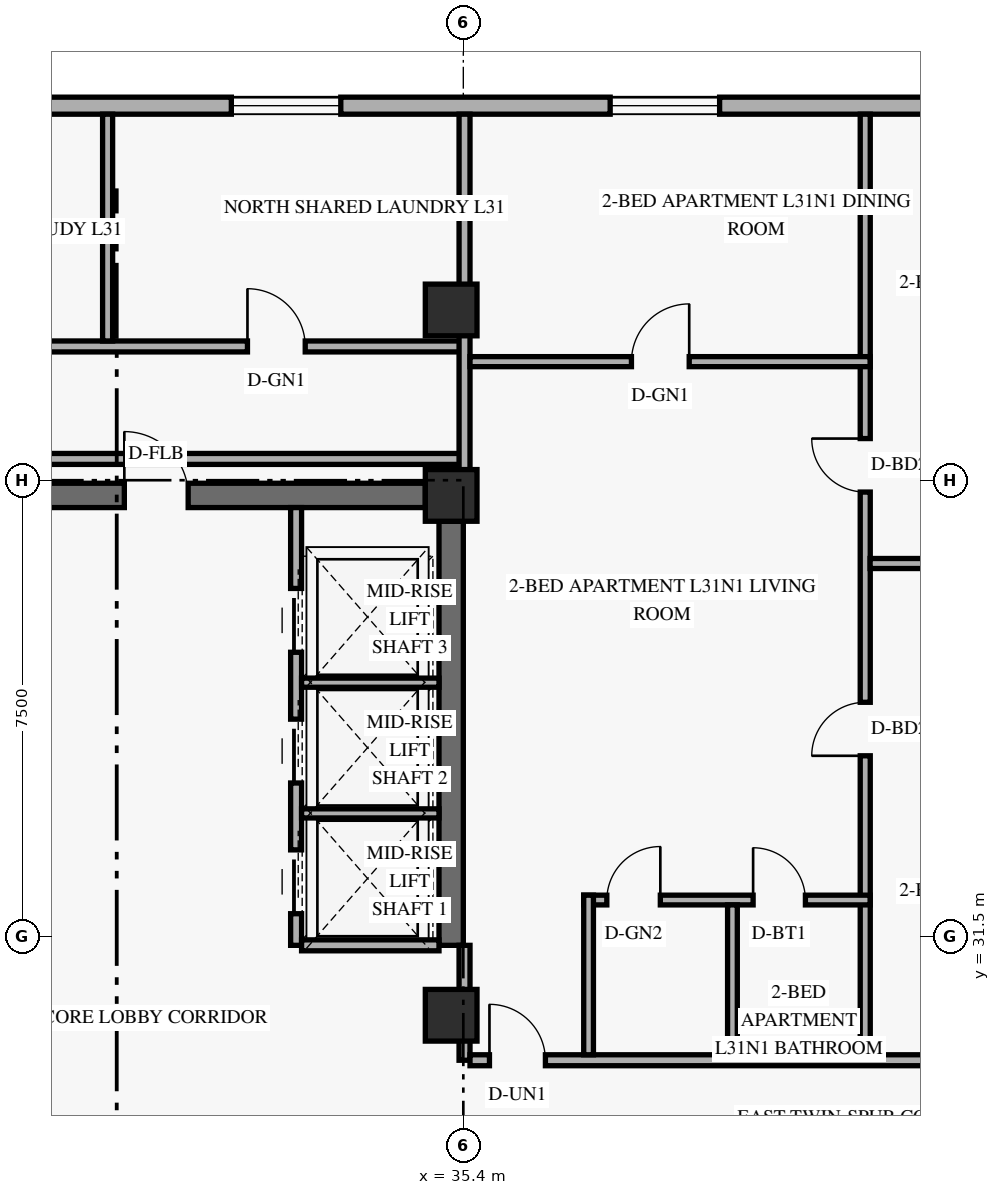
"""IFC4 building model, lengths in metres.
Left out: names, types, materials, properties, quantities, classifications, styles, units other than length and angle.
Written with IfcOpenShell. Run it as: python <this file> out.ifc"""

import sys

from ifc_helpers import new_model, si_unit, direction, frame, frame_2d, origin, origin_2d, place, context, subcontext, project, spatial, rectangle, extrude, element, fill, save


model = new_model("IFC4")
c1 = context("Model", 3, precision=1e-05, world=origin(), true_north=direction((0.0, 1.0)))
c2 = subcontext(c1, "Body", "Model", "MODEL_VIEW")
j1 = project(units=[si_unit("LENGTHUNIT", "METRE"), si_unit("PLANEANGLEUNIT", "RADIAN")], contexts=[c1])
p1 = place(None, origin())
s1 = spatial("IfcSite", under=j1, at=p1, CompositionType="ELEMENT")
p2 = place(p1, origin())
s2 = spatial("IfcBuilding", under=s1, at=p2, CompositionType="ELEMENT")
p3 = place(p2, frame((0.0, 0.0, 121.2)))
s3 = spatial("IfcBuildingStorey", under=s2, at=p3, CompositionType="ELEMENT", Elevation=121.2)
p4 = place(p3, frame((35.2, 31.35, 0.0), z_axis=(0.0, 0.0, 1.0), x_axis=(0.0, 1.0, 0.0)))
e1 = element("IfcWall", 1, at=p4, inside=s3, PredefinedType="SHEAR", context=c2, shape_type="SweptSolid", body=[
    extrude(rectangle(XDim=6.975, YDim=0.4, at=frame_2d((3.487, 0.0))), origin(), (0.0, 0.0, 1.0), 2.749),
])
p5 = place(p3, frame((24.625, 38.75, 0.0), z_axis=(0.0, 0.0, 1.0), x_axis=(1.0, 0.0, 0.0)))
e2 = element("IfcWall", 2, at=p5, inside=s3, PredefinedType="SHEAR", context=c2, shape_type="SweptSolid", body=[
    extrude(rectangle(XDim=10.15, YDim=0.4, at=frame_2d((5.075, 0.0))), origin(), (0.0, 0.0, 1.0), 3.36),
])
p6 = place(p5, frame((5.2, 0.0, 0.0)))
e3 = element("IfcOpeningElement", 3, at=p6, cuts=e2, PredefinedType="OPENING", context=c2, shape_type="SweptSolid", body=[
    extrude(rectangle(XDim=1.05, YDim=2.15, at=frame_2d((0.525, 1.075))), frame((0.0, 0.21, 0.0), z_axis=(0.0, -1.0, 0.0), x_axis=(1.0, 0.0, 0.0)), (0.0, 0.0, 1.0), 0.42),
])
for number, where, z_axis, x_axis in (
    (4, (35.2, 30.2, 0.0), (0.0, 0.0, 1.0), (1.0, 0.0, 0.0)),
    (5, (35.2, 38.75, 0.0), (0.0, 0.0, 1.0), (1.0, 0.0, 0.0)),
    (6, (35.2, 41.8, 0.0), (0.0, 0.0, 1.0), (1.0, 0.0, 0.0)),
):
    element("IfcColumn", number, at=place(p3, frame(where, z_axis=z_axis, x_axis=x_axis)), inside=s3, PredefinedType="COLUMN", context=c2, shape_type="SweptSolid", body=[
        extrude(rectangle(XDim=0.85, YDim=0.85, at=origin_2d()), origin(), (0.0, 0.0, 1.0), 3.6),
    ])
p7 = place(p3, frame((49.98, 45.16, 0.0), z_axis=(0.0, 0.0, 1.0), x_axis=(-1.0, 0.0, 0.0)))
e7 = element("IfcWall", 7, at=p7, inside=s3, PredefinedType="SOLIDWALL", context=c2, shape_type="SweptSolid", body=[
    extrude(rectangle(XDim=36.56, YDim=0.28, at=frame_2d((18.28, 0.0))), origin(), (0.0, 0.0, 1.0), 3.36),
])
p8 = place(p7, frame((31.545, 0.0, 0.85)))
e8 = element("IfcOpeningElement", 8, at=p8, cuts=e7, PredefinedType="OPENING", context=c2, shape_type="SweptSolid", body=[
    extrude(rectangle(XDim=1.8, YDim=1.6, at=frame_2d((0.9, 0.8))), frame((0.0, 0.15, 0.0), z_axis=(0.0, -1.0, 0.0), x_axis=(1.0, 0.0, 0.0)), (0.0, 0.0, 1.0), 0.3),
])
p9 = place(p7, frame((23.48, 0.0, 0.85)))
e9 = element("IfcOpeningElement", 9, at=p9, cuts=e7, PredefinedType="OPENING", context=c2, shape_type="SweptSolid", body=[
    extrude(rectangle(XDim=1.8, YDim=1.6, at=frame_2d((0.9, 0.8))), frame((0.0, 0.15, 0.0), z_axis=(0.0, -1.0, 0.0), x_axis=(1.0, 0.0, 0.0)), (0.0, 0.0, 1.0), 0.3),
])
p10 = place(p7, frame((16.595, 0.0, 0.85)))
e10 = element("IfcOpeningElement", 10, at=p10, cuts=e7, PredefinedType="OPENING", context=c2, shape_type="SweptSolid", body=[
    extrude(rectangle(XDim=1.8, YDim=1.6, at=frame_2d((0.9, 0.8))), frame((0.0, 0.15, 0.0), z_axis=(0.0, -1.0, 0.0), x_axis=(1.0, 0.0, 0.0)), (0.0, 0.0, 1.0), 0.3),
])
p11 = place(p7, frame((10.365, 0.0, 0.85)))
e11 = element("IfcOpeningElement", 11, at=p11, cuts=e7, PredefinedType="OPENING", context=c2, shape_type="SweptSolid", body=[
    extrude(rectangle(XDim=1.8, YDim=1.6, at=frame_2d((0.9, 0.8))), frame((0.0, 0.15, 0.0), z_axis=(0.0, -1.0, 0.0), x_axis=(1.0, 0.0, 0.0)), (0.0, 0.0, 1.0), 0.3),
])
p12 = place(p7, frame((4.575, 0.0, 0.85)))
e12 = element("IfcOpeningElement", 12, at=p12, cuts=e7, PredefinedType="OPENING", context=c2, shape_type="SweptSolid", body=[
    extrude(rectangle(XDim=1.8, YDim=1.6, at=frame_2d((0.9, 0.8))), frame((0.0, 0.15, 0.0), z_axis=(0.0, -1.0, 0.0), x_axis=(1.0, 0.0, 0.0)), (0.0, 0.0, 1.0), 0.3),
])
p13 = place(p7, frame((0.59, 0.0, 0.85)))
e13 = element("IfcOpeningElement", 13, at=p13, cuts=e7, PredefinedType="OPENING", context=c2, shape_type="SweptSolid", body=[
    extrude(rectangle(XDim=1.8, YDim=1.6, at=frame_2d((0.9, 0.8))), frame((0.0, 0.15, 0.0), z_axis=(0.0, -1.0, 0.0), x_axis=(1.0, 0.0, 0.0)), (0.0, 0.0, 1.0), 0.3),
])
p14 = place(p3, frame((32.65, 31.35, 0.0), z_axis=(0.0, 0.0, 1.0), x_axis=(0.0, 1.0, 0.0)))
e14 = element("IfcWall", 14, at=p14, inside=s3, PredefinedType="STANDARD", context=c2, shape_type="SweptSolid", body=[
    extrude(rectangle(XDim=7.2, YDim=0.18, at=frame_2d((3.6, 0.0))), origin(), (0.0, 0.0, 1.0), 3.36),
])
p15 = place(p14, frame((0.52, 0.0, 0.0)))
e15 = element("IfcOpeningElement", 15, at=p15, cuts=e14, PredefinedType="OPENING", context=c2, shape_type="SweptSolid", body=[
    extrude(rectangle(XDim=1.05, YDim=2.2, at=frame_2d((0.525, 1.1))), frame((0.0, 0.1, 0.0), z_axis=(0.0, -1.0, 0.0), x_axis=(1.0, 0.0, 0.0)), (0.0, 0.0, 1.0), 0.2),
])
p16 = place(p14, frame((2.67, 0.0, 0.0)))
e16 = element("IfcOpeningElement", 16, at=p16, cuts=e14, PredefinedType="OPENING", context=c2, shape_type="SweptSolid", body=[
    extrude(rectangle(XDim=1.05, YDim=2.2, at=frame_2d((0.525, 1.1))), frame((0.0, 0.1, 0.0), z_axis=(0.0, -1.0, 0.0), x_axis=(1.0, 0.0, 0.0)), (0.0, 0.0, 1.0), 0.2),
])
p17 = place(p14, frame((4.82, 0.0, 0.0)))
e17 = element("IfcOpeningElement", 17, at=p17, cuts=e14, PredefinedType="OPENING", context=c2, shape_type="SweptSolid", body=[
    extrude(rectangle(XDim=1.05, YDim=2.2, at=frame_2d((0.525, 1.1))), frame((0.0, 0.1, 0.0), z_axis=(0.0, -1.0, 0.0), x_axis=(1.0, 0.0, 0.0)), (0.0, 0.0, 1.0), 0.2),
])
p18 = place(p3, frame((32.74, 31.35, 0.0), z_axis=(0.0, 0.0, 1.0), x_axis=(1.0, 0.0, 0.0)))
e18 = element("IfcWall", 18, at=p18, inside=s3, PredefinedType="STANDARD", context=c2, shape_type="SweptSolid", body=[
    extrude(rectangle(XDim=2.26, YDim=0.18, at=frame_2d((1.13, 0.0))), origin(), (0.0, 0.0, 1.0), 3.36),
])
for number, where, z_axis, x_axis in (
    (19, (32.74, 33.52, 0.0), (0.0, 0.0, 1.0), (1.0, 0.0, 0.0)),
    (20, (32.74, 35.67, 0.0), (0.0, 0.0, 1.0), (1.0, 0.0, 0.0)),
):
    element("IfcWall", number, at=place(p3, frame(where, z_axis=z_axis, x_axis=x_axis)), inside=s3, PredefinedType="STANDARD", context=c2, shape_type="SweptSolid", body=[
        extrude(rectangle(XDim=2.26, YDim=0.15, at=frame_2d((1.13, 0.0))), origin(), (0.0, 0.0, 1.0), 3.36),
    ])
p19 = place(p3, frame((35.42, 29.46, 0.0), z_axis=(0.0, 0.0, 1.0), x_axis=(0.0, 1.0, 0.0)))
e21 = element("IfcWall", 21, at=p19, inside=s3, PredefinedType="STANDARD", context=c2, shape_type="SweptSolid", body=[
    extrude(rectangle(XDim=1.89, YDim=0.18, at=frame_2d((0.945, 0.0))), origin(), (0.0, 0.0, 1.0), 2.731),
])
p20 = place(p3, frame((35.51, 29.46, 0.0), z_axis=(0.0, 0.0, 1.0), x_axis=(1.0, 0.0, 0.0)))
e22 = element("IfcWall", 22, at=p20, inside=s3, PredefinedType="STANDARD", context=c2, shape_type="SweptSolid", body=[
    extrude(rectangle(XDim=11.49, YDim=0.18, at=frame_2d((5.745, 0.0))), origin(), (0.0, 0.0, 1.0), 2.731),
])
p21 = place(p20, frame((0.32, 0.0, 0.0)))
e23 = element("IfcOpeningElement", 23, at=p21, cuts=e22, PredefinedType="OPENING", context=c2, shape_type="SweptSolid", body=[
    extrude(rectangle(XDim=0.92, YDim=2.15, at=frame_2d((0.46, 1.075))), frame((0.0, 0.1, 0.0), z_axis=(0.0, -1.0, 0.0), x_axis=(1.0, 0.0, 0.0)), (0.0, 0.0, 1.0), 0.2),
])
p22 = place(p3, frame((21.74, 41.2, 0.0), z_axis=(0.0, 0.0, 1.0), x_axis=(1.0, 0.0, 0.0)))
e24 = element("IfcWall", 24, at=p22, inside=s3, PredefinedType="STANDARD", context=c2, shape_type="SweptSolid", body=[
    extrude(rectangle(XDim=13.68, YDim=0.18, at=frame_2d((6.84, 0.0))), origin(), (0.0, 0.0, 1.0), 2.731),
])
p23 = place(p22, frame((3.09, 0.0, 0.0)))
e25 = element("IfcOpeningElement", 25, at=p23, cuts=e24, PredefinedType="OPENING", context=c2, shape_type="SweptSolid", body=[
    extrude(rectangle(XDim=0.95, YDim=2.15, at=frame_2d((0.475, 1.075))), frame((0.0, 0.1, 0.0), z_axis=(0.0, -1.0, 0.0), x_axis=(1.0, 0.0, 0.0)), (0.0, 0.0, 1.0), 0.2),
])
p24 = place(p22, frame((10.11, 0.0, 0.0)))
e26 = element("IfcOpeningElement", 26, at=p24, cuts=e24, PredefinedType="OPENING", context=c2, shape_type="SweptSolid", body=[
    extrude(rectangle(XDim=0.95, YDim=2.15, at=frame_2d((0.475, 1.075))), frame((0.0, 0.1, 0.0), z_axis=(0.0, -1.0, 0.0), x_axis=(1.0, 0.0, 0.0)), (0.0, 0.0, 1.0), 0.2),
])
p25 = place(p3, frame((23.85, 39.35, 0.0), z_axis=(0.0, 0.0, 1.0), x_axis=(1.0, 0.0, 0.0)))
e27 = element("IfcWall", 27, at=p25, inside=s3, PredefinedType="STANDARD", context=c2, shape_type="SweptSolid", body=[
    extrude(rectangle(XDim=11.57, YDim=0.18, at=frame_2d((5.785, 0.0))), origin(), (0.0, 0.0, 1.0), 2.731),
])
p26 = place(p3, frame((35.42, 38.75, 0.0), z_axis=(0.0, 0.0, 1.0), x_axis=(0.0, 1.0, 0.0)))
e28 = element("IfcWall", 28, at=p26, inside=s3, PredefinedType="PARTITIONING", context=c2, shape_type="SweptSolid", body=[
    extrude(rectangle(XDim=6.27, YDim=0.18, at=frame_2d((3.135, 0.0))), origin(), (0.0, 0.0, 1.0), 2.731),
])
p27 = place(p3, frame((42.01, 29.55, 0.0), z_axis=(0.0, 0.0, 1.0), x_axis=(0.0, 1.0, 0.0)))
e29 = element("IfcWall", 29, at=p27, inside=s3, PredefinedType="PARTITIONING", context=c2, shape_type="SweptSolid", body=[
    extrude(rectangle(XDim=15.47, YDim=0.165, at=frame_2d((7.735, 0.0))), origin(), (0.0, 0.0, 1.0), 2.731),
])
p28 = place(p27, frame((4.917, 0.0, 0.0)))
e30 = element("IfcOpeningElement", 30, at=p28, cuts=e29, PredefinedType="OPENING", context=c2, shape_type="SweptSolid", body=[
    extrude(rectangle(XDim=0.88, YDim=2.14, at=frame_2d((0.44, 1.07))), frame((0.0, 0.093, 0.0), z_axis=(0.0, -1.0, 0.0), x_axis=(1.0, 0.0, 0.0)), (0.0, 0.0, 1.0), 0.185),
])
p29 = place(p27, frame((9.255, 0.0, 0.0)))
e31 = element("IfcOpeningElement", 31, at=p29, cuts=e29, PredefinedType="OPENING", context=c2, shape_type="SweptSolid", body=[
    extrude(rectangle(XDim=0.88, YDim=2.14, at=frame_2d((0.44, 1.07))), frame((0.0, 0.093, 0.0), z_axis=(0.0, -1.0, 0.0), x_axis=(1.0, 0.0, 0.0)), (0.0, 0.0, 1.0), 0.185),
])
p30 = place(p3, frame((37.38, 32.095, 0.0), z_axis=(0.0, 0.0, 1.0), x_axis=(1.0, 0.0, 0.0)))
e32 = element("IfcWall", 32, at=p30, inside=s3, PredefinedType="PLUMBINGWALL", context=c2, shape_type="SweptSolid", body=[
    extrude(rectangle(XDim=4.71, YDim=0.16, at=frame_2d((2.355, 0.0))), origin(), (0.0, 0.0, 1.0), 3.36),
])
p31 = place(p30, frame((0.38, 0.0, 0.0)))
e33 = element("IfcOpeningElement", 33, at=p31, cuts=e32, PredefinedType="OPENING", context=c2, shape_type="SweptSolid", body=[
    extrude(rectangle(XDim=0.88, YDim=2.12, at=frame_2d((0.44, 1.06))), frame((0.0, 0.09, 0.0), z_axis=(0.0, -1.0, 0.0), x_axis=(1.0, 0.0, 0.0)), (0.0, 0.0, 1.0), 0.18),
])
p32 = place(p30, frame((2.786, 0.0, 0.0)))
e34 = element("IfcOpeningElement", 34, at=p32, cuts=e32, PredefinedType="OPENING", context=c2, shape_type="SweptSolid", body=[
    extrude(rectangle(XDim=0.86, YDim=2.12, at=frame_2d((0.43, 1.06))), frame((0.0, 0.09, 0.0), z_axis=(0.0, -1.0, 0.0), x_axis=(1.0, 0.0, 0.0)), (0.0, 0.0, 1.0), 0.18),
])
p33 = place(p3, frame((37.46, 29.55, 0.0), z_axis=(0.0, 0.0, 1.0), x_axis=(0.0, 1.0, 0.0)))
e35 = element("IfcWall", 35, at=p33, inside=s3, PredefinedType="PLUMBINGWALL", context=c2, shape_type="SweptSolid", body=[
    extrude(rectangle(XDim=2.625, YDim=0.16, at=frame_2d((1.312, 0.0))), origin(), (0.0, 0.0, 1.0), 2.731),
])
p34 = place(p3, frame((39.826, 29.55, 0.0), z_axis=(0.0, 0.0, 1.0), x_axis=(0.0, 1.0, 0.0)))
e36 = element("IfcWall", 36, at=p34, inside=s3, PredefinedType="PLUMBINGWALL", context=c2, shape_type="SweptSolid", body=[
    extrude(rectangle(XDim=2.465, YDim=0.16, at=frame_2d((1.232, 0.0))), origin(), (0.0, 0.0, 1.0), 2.731),
])
p35 = place(p3, frame((35.51, 40.95, 0.0), z_axis=(0.0, 0.0, 1.0), x_axis=(1.0, 0.0, 0.0)))
e37 = element("IfcWall", 37, at=p35, inside=s3, PredefinedType="PARTITIONING", context=c2, shape_type="SweptSolid", body=[
    extrude(rectangle(XDim=6.58, YDim=0.165, at=frame_2d((3.29, 0.0))), origin(), (0.0, 0.0, 1.0), 3.36),
])
p36 = place(p35, frame((2.655, 0.0, 0.0)))
e38 = element("IfcOpeningElement", 38, at=p36, cuts=e37, PredefinedType="OPENING", context=c2, shape_type="SweptSolid", body=[
    extrude(rectangle(XDim=0.95, YDim=2.15, at=frame_2d((0.475, 1.075))), frame((0.0, 0.093, 0.0), z_axis=(0.0, -1.0, 0.0), x_axis=(1.0, 0.0, 0.0)), (0.0, 0.0, 1.0), 0.185),
])
p37 = place(p3, frame((42.09, 37.63, 0.0), z_axis=(0.0, 0.0, 1.0), x_axis=(1.0, 0.0, 0.0)))
e39 = element("IfcWall", 39, at=p37, inside=s3, PredefinedType="PARTITIONING", context=c2, shape_type="SweptSolid", body=[
    extrude(rectangle(XDim=4.82, YDim=0.165, at=frame_2d((2.41, 0.0))), origin(), (0.0, 0.0, 1.0), 2.731),
])
p38 = place(p3, frame((29.55, 41.29, 0.0), z_axis=(0.0, 0.0, 1.0), x_axis=(0.0, 1.0, 0.0)))
e40 = element("IfcWall", 40, at=p38, inside=s3, PredefinedType="PARTITIONING", context=c2, shape_type="SweptSolid", body=[
    extrude(rectangle(XDim=3.73, YDim=0.165, at=frame_2d((1.865, 0.0))), origin(), (0.0, 0.0, 1.0), 2.809),
])
p39 = place(p10, origin())
e41 = element("IfcWindow", 41, at=p39, inside=s3, PartitioningType="SINGLE_PANEL", PredefinedType="WINDOW", context=c2, shape_type="SweptSolid", body=[
    extrude(rectangle(XDim=1.8, YDim=1.6, at=frame_2d((0.9, 0.8))), frame((0.0, 0.03, 0.0), z_axis=(0.0, -1.0, 0.0), x_axis=(1.0, 0.0, 0.0)), (0.0, 0.0, 1.0), 0.06),
])
fill(e10, e41)
p40 = place(p11, origin())
e42 = element("IfcWindow", 42, at=p40, inside=s3, PartitioningType="SINGLE_PANEL", PredefinedType="WINDOW", context=c2, shape_type="SweptSolid", body=[
    extrude(rectangle(XDim=1.8, YDim=1.6, at=frame_2d((0.9, 0.8))), frame((0.0, 0.03, 0.0), z_axis=(0.0, -1.0, 0.0), x_axis=(1.0, 0.0, 0.0)), (0.0, 0.0, 1.0), 0.06),
])
fill(e11, e42)
p41 = place(p15, origin())
e43 = element("IfcDoor", 43, at=p41, inside=s3, OperationType="SLIDING_TO_LEFT", PredefinedType="DOOR", context=c2, shape_type="SweptSolid", body=[
    extrude(rectangle(XDim=1.05, YDim=2.2, at=frame_2d((0.525, 1.1))), frame((0.0, 0.025, 0.0), z_axis=(0.0, -1.0, 0.0), x_axis=(1.0, 0.0, 0.0)), (0.0, 0.0, 1.0), 0.05),
])
fill(e15, e43)
p42 = place(p16, origin())
e44 = element("IfcDoor", 44, at=p42, inside=s3, OperationType="SLIDING_TO_LEFT", PredefinedType="DOOR", context=c2, shape_type="SweptSolid", body=[
    extrude(rectangle(XDim=1.05, YDim=2.2, at=frame_2d((0.525, 1.1))), frame((0.0, 0.025, 0.0), z_axis=(0.0, -1.0, 0.0), x_axis=(1.0, 0.0, 0.0)), (0.0, 0.0, 1.0), 0.05),
])
fill(e16, e44)
p43 = place(p17, origin())
e45 = element("IfcDoor", 45, at=p43, inside=s3, OperationType="SLIDING_TO_LEFT", PredefinedType="DOOR", context=c2, shape_type="SweptSolid", body=[
    extrude(rectangle(XDim=1.05, YDim=2.2, at=frame_2d((0.525, 1.1))), frame((0.0, 0.025, 0.0), z_axis=(0.0, -1.0, 0.0), x_axis=(1.0, 0.0, 0.0)), (0.0, 0.0, 1.0), 0.05),
])
fill(e17, e45)
p44 = place(p6, frame((1.05, 0.0, 0.0), z_axis=(0.0, 0.0, 1.0), x_axis=(-1.0, 0.0, 0.0)))
e46 = element("IfcDoor", 46, at=p44, inside=s3, OperationType="SINGLE_SWING_RIGHT", PredefinedType="DOOR", context=c2, shape_type="SweptSolid", body=[
    extrude(rectangle(XDim=1.05, YDim=2.15, at=frame_2d((0.525, 1.075))), frame((0.0, 0.025, 0.0), z_axis=(0.0, -1.0, 0.0), x_axis=(1.0, 0.0, 0.0)), (0.0, 0.0, 1.0), 0.05),
])
fill(e3, e46)
p45 = place(p36, origin())
e47 = element("IfcDoor", 47, at=p45, inside=s3, OperationType="SINGLE_SWING_RIGHT", PredefinedType="DOOR", context=c2, shape_type="SweptSolid", body=[
    extrude(rectangle(XDim=0.95, YDim=2.15, at=frame_2d((0.475, 1.075))), frame((0.0, 0.025, 0.0), z_axis=(0.0, -1.0, 0.0), x_axis=(1.0, 0.0, 0.0)), (0.0, 0.0, 1.0), 0.05),
])
fill(e38, e47)
p46 = place(p21, origin())
e48 = element("IfcDoor", 48, at=p46, inside=s3, OperationType="SINGLE_SWING_LEFT", PredefinedType="DOOR", context=c2, shape_type="SweptSolid", body=[
    extrude(rectangle(XDim=0.92, YDim=2.15, at=frame_2d((0.46, 1.075))), frame((0.0, 0.025, 0.0), z_axis=(0.0, -1.0, 0.0), x_axis=(1.0, 0.0, 0.0)), (0.0, 0.0, 1.0), 0.05),
])
fill(e23, e48)
p47 = place(p31, origin())
e49 = element("IfcDoor", 49, at=p47, inside=s3, OperationType="SINGLE_SWING_RIGHT", PredefinedType="DOOR", context=c2, shape_type="SweptSolid", body=[
    extrude(rectangle(XDim=0.88, YDim=2.12, at=frame_2d((0.44, 1.06))), frame((0.0, 0.025, 0.0), z_axis=(0.0, -1.0, 0.0), x_axis=(1.0, 0.0, 0.0)), (0.0, 0.0, 1.0), 0.05),
])
fill(e33, e49)
p48 = place(p32, origin())
e50 = element("IfcDoor", 50, at=p48, inside=s3, OperationType="SINGLE_SWING_LEFT", PredefinedType="DOOR", context=c2, shape_type="SweptSolid", body=[
    extrude(rectangle(XDim=0.86, YDim=2.12, at=frame_2d((0.43, 1.06))), frame((0.0, 0.025, 0.0), z_axis=(0.0, -1.0, 0.0), x_axis=(1.0, 0.0, 0.0)), (0.0, 0.0, 1.0), 0.05),
])
fill(e34, e50)
p49 = place(p28, origin())
e51 = element("IfcDoor", 51, at=p49, inside=s3, OperationType="SINGLE_SWING_LEFT", PredefinedType="DOOR", context=c2, shape_type="SweptSolid", body=[
    extrude(rectangle(XDim=0.88, YDim=2.14, at=frame_2d((0.44, 1.07))), frame((0.0, 0.025, 0.0), z_axis=(0.0, -1.0, 0.0), x_axis=(1.0, 0.0, 0.0)), (0.0, 0.0, 1.0), 0.05),
])
fill(e30, e51)
p50 = place(p29, origin())
e52 = element("IfcDoor", 52, at=p50, inside=s3, OperationType="SINGLE_SWING_RIGHT", PredefinedType="DOOR", context=c2, shape_type="SweptSolid", body=[
    extrude(rectangle(XDim=0.88, YDim=2.14, at=frame_2d((0.44, 1.07))), frame((0.0, 0.025, 0.0), z_axis=(0.0, -1.0, 0.0), x_axis=(1.0, 0.0, 0.0)), (0.0, 0.0, 1.0), 0.05),
])
fill(e31, e52)
p51 = place(p24, origin())
e53 = element("IfcDoor", 53, at=p51, inside=s3, OperationType="SINGLE_SWING_LEFT", PredefinedType="DOOR", context=c2, shape_type="SweptSolid", body=[
    extrude(rectangle(XDim=0.95, YDim=2.15, at=frame_2d((0.475, 1.075))), frame((0.0, 0.025, 0.0), z_axis=(0.0, -1.0, 0.0), x_axis=(1.0, 0.0, 0.0)), (0.0, 0.0, 1.0), 0.05),
])
fill(e26, e53)
save(model, sys.argv[1])
